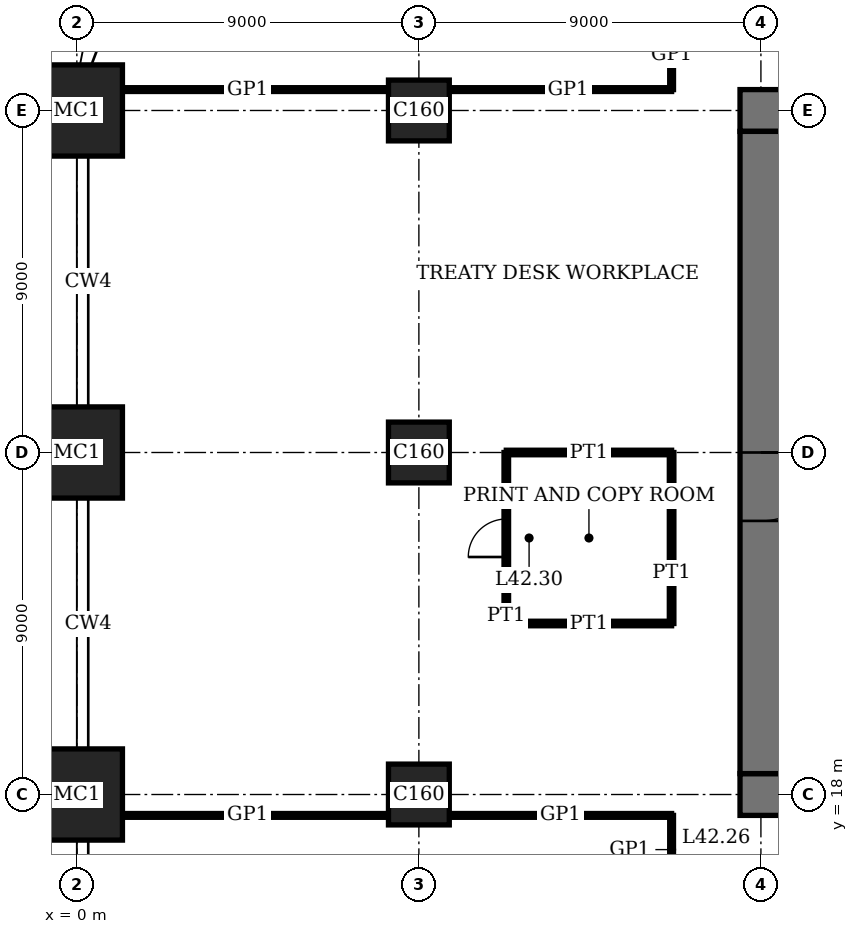
"""IFC4 building model, lengths in metres.
Left out: names, types, materials, properties, quantities, classifications, styles, units other than length and angle.
Written with IfcOpenShell. Run it as: python <this file> out.ifc"""

import sys

from ifc_helpers import new_model, si_unit, direction, frame, frame_2d, origin, origin_2d, place, context, subcontext, project, spatial, rectangle, extrude, element, fill, save


model = new_model("IFC4")
c1 = context("Model", 3, precision=1e-05, world=origin(), true_north=direction((0.0, 1.0)))
c2 = subcontext(c1, "Body", "Model", "MODEL_VIEW")
j1 = project(units=[si_unit("LENGTHUNIT", "METRE"), si_unit("PLANEANGLEUNIT", "RADIAN")], contexts=[c1])
p1 = place(None, origin())
s1 = spatial("IfcSite", under=j1, at=p1, CompositionType="ELEMENT")
p2 = place(p1, origin())
s2 = spatial("IfcBuilding", under=s1, at=p2, CompositionType="ELEMENT")
p3 = place(p2, frame((0.0, 0.0, 174.2)))
s3 = spatial("IfcBuildingStorey", under=s2, at=p3, CompositionType="ELEMENT", Elevation=174.2)
for number, where, z_axis, x_axis in (
    (1, (0.0, 18.0, 0.0), (0.0, 0.0, 1.0), (1.0, 0.0, 0.0)),
    (2, (0.0, 27.0, 0.0), (0.0, 0.0, 1.0), (1.0, 0.0, 0.0)),
    (3, (0.0, 36.0, 0.0), (0.0, 0.0, 1.0), (1.0, 0.0, 0.0)),
):
    element("IfcColumn", number, at=place(p3, frame(where, z_axis=z_axis, x_axis=x_axis)), inside=s3, PredefinedType="COLUMN", context=c2, shape_type="SweptSolid", body=[
        extrude(rectangle(XDim=2.4, YDim=2.4, at=origin_2d()), origin(), (0.0, 0.0, 1.0), 4.0),
    ])
for number, where, z_axis, x_axis in (
    (4, (9.0, 18.0, 0.0), (0.0, 0.0, 1.0), (1.0, 0.0, 0.0)),
    (5, (9.0, 27.0, 0.0), (0.0, 0.0, 1.0), (1.0, 0.0, 0.0)),
    (6, (9.0, 36.0, 0.0), (0.0, 0.0, 1.0), (1.0, 0.0, 0.0)),
):
    element("IfcColumn", number, at=place(p3, frame(where, z_axis=z_axis, x_axis=x_axis)), inside=s3, PredefinedType="COLUMN", context=c2, shape_type="SweptSolid", body=[
        extrude(rectangle(XDim=1.6, YDim=1.6, at=origin_2d()), origin(), (0.0, 0.0, 1.0), 4.0),
    ])
p4 = place(p3, frame((17.45, 18.0, 0.0), z_axis=(0.0, 0.0, 1.0), x_axis=(1.0, 0.0, 0.0)))
e7 = element("IfcWall", 7, at=p4, inside=s3, PredefinedType="SHEAR", context=c2, shape_type="SweptSolid", body=[
    extrude(rectangle(XDim=28.1, YDim=1.1, at=frame_2d((14.05, 0.0))), origin(), (0.0, 0.0, 1.0), 4.0),
])
p5 = place(p4, frame((11.55, 0.0, 0.0)))
e8 = element("IfcOpeningElement", 8, at=p5, cuts=e7, PredefinedType="OPENING", context=c2, shape_type="SweptSolid", body=[
    extrude(rectangle(XDim=1.0, YDim=2.4, at=frame_2d((0.5, 1.2))), frame((0.0, 0.56, 0.0), z_axis=(0.0, -1.0, 0.0), x_axis=(1.0, 0.0, 0.0)), (0.0, 0.0, 1.0), 1.12),
])
p6 = place(p4, frame((16.55, 0.0, 0.0)))
e9 = element("IfcOpeningElement", 9, at=p6, cuts=e7, PredefinedType="OPENING", context=c2, shape_type="SweptSolid", body=[
    extrude(rectangle(XDim=1.0, YDim=2.4, at=frame_2d((0.5, 1.2))), frame((0.0, 0.56, 0.0), z_axis=(0.0, -1.0, 0.0), x_axis=(1.0, 0.0, 0.0)), (0.0, 0.0, 1.0), 1.12),
])
p7 = place(p4, frame((20.0, 0.0, 0.0)))
e10 = element("IfcOpeningElement", 10, at=p7, cuts=e7, PredefinedType="OPENING", context=c2, shape_type="SweptSolid", body=[
    extrude(rectangle(XDim=1.1, YDim=2.4, at=frame_2d((0.55, 1.2))), frame((0.0, 0.56, 0.0), z_axis=(0.0, -1.0, 0.0), x_axis=(1.0, 0.0, 0.0)), (0.0, 0.0, 1.0), 1.12),
])
p8 = place(p4, frame((24.05, 0.0, 0.0)))
e11 = element("IfcOpeningElement", 11, at=p8, cuts=e7, PredefinedType="OPENING", context=c2, shape_type="SweptSolid", body=[
    extrude(rectangle(XDim=1.0, YDim=2.4, at=frame_2d((0.5, 1.2))), frame((0.0, 0.56, 0.0), z_axis=(0.0, -1.0, 0.0), x_axis=(1.0, 0.0, 0.0)), (0.0, 0.0, 1.0), 1.12),
])
p9 = place(p3, frame((45.55, 36.0, 0.0), z_axis=(0.0, 0.0, 1.0), x_axis=(-1.0, 0.0, 0.0)))
e12 = element("IfcWall", 12, at=p9, inside=s3, PredefinedType="SHEAR", context=c2, shape_type="SweptSolid", body=[
    extrude(rectangle(XDim=28.1, YDim=1.1, at=frame_2d((14.05, 0.0))), origin(), (0.0, 0.0, 1.0), 4.0),
])
p10 = place(p9, frame((11.55, 0.0, 0.0)))
e13 = element("IfcOpeningElement", 13, at=p10, cuts=e12, PredefinedType="OPENING", context=c2, shape_type="SweptSolid", body=[
    extrude(rectangle(XDim=1.0, YDim=2.4, at=frame_2d((0.5, 1.2))), frame((0.0, 0.56, 0.0), z_axis=(0.0, -1.0, 0.0), x_axis=(1.0, 0.0, 0.0)), (0.0, 0.0, 1.0), 1.12),
])
p11 = place(p9, frame((16.55, 0.0, 0.0)))
e14 = element("IfcOpeningElement", 14, at=p11, cuts=e12, PredefinedType="OPENING", context=c2, shape_type="SweptSolid", body=[
    extrude(rectangle(XDim=1.0, YDim=2.4, at=frame_2d((0.5, 1.2))), frame((0.0, 0.56, 0.0), z_axis=(0.0, -1.0, 0.0), x_axis=(1.0, 0.0, 0.0)), (0.0, 0.0, 1.0), 1.12),
])
p12 = place(p9, frame((20.0, 0.0, 0.0)))
e15 = element("IfcOpeningElement", 15, at=p12, cuts=e12, PredefinedType="OPENING", context=c2, shape_type="SweptSolid", body=[
    extrude(rectangle(XDim=1.1, YDim=2.4, at=frame_2d((0.55, 1.2))), frame((0.0, 0.56, 0.0), z_axis=(0.0, -1.0, 0.0), x_axis=(1.0, 0.0, 0.0)), (0.0, 0.0, 1.0), 1.12),
])
p13 = place(p9, frame((24.05, 0.0, 0.0)))
e16 = element("IfcOpeningElement", 16, at=p13, cuts=e12, PredefinedType="OPENING", context=c2, shape_type="SweptSolid", body=[
    extrude(rectangle(XDim=1.0, YDim=2.4, at=frame_2d((0.5, 1.2))), frame((0.0, 0.56, 0.0), z_axis=(0.0, -1.0, 0.0), x_axis=(1.0, 0.0, 0.0)), (0.0, 0.0, 1.0), 1.12),
])
p14 = place(p3, frame((18.0, 35.45, 0.0), z_axis=(0.0, 0.0, 1.0), x_axis=(0.0, -1.0, 0.0)))
e17 = element("IfcWall", 17, at=p14, inside=s3, PredefinedType="SHEAR", context=c2, shape_type="SweptSolid", body=[
    extrude(rectangle(XDim=16.9, YDim=1.1, at=frame_2d((8.45, 0.0))), origin(), (0.0, 0.0, 1.0), 4.0),
])
p15 = place(p14, frame((8.45, 0.0, 0.0)))
e18 = element("IfcOpeningElement", 18, at=p15, cuts=e17, PredefinedType="OPENING", context=c2, shape_type="SweptSolid", body=[
    extrude(rectangle(XDim=1.8, YDim=2.4, at=frame_2d((0.9, 1.2))), frame((0.0, 0.56, 0.0), z_axis=(0.0, -1.0, 0.0), x_axis=(1.0, 0.0, 0.0)), (0.0, 0.0, 1.0), 1.12),
])
p16 = place(p3, frame((1.2, 17.45, 0.0), z_axis=(0.0, 0.0, 1.0), x_axis=(1.0, 0.0, 0.0)))
e19 = element("IfcWall", 19, at=p16, inside=s3, PredefinedType="PARTITIONING", context=c2, shape_type="SweptSolid", body=[
    extrude(rectangle(XDim=7.0, YDim=0.1, at=frame_2d((3.5, 0.0))), origin(), (0.0, 0.0, 1.0), 3.75),
])
p17 = place(p3, frame((9.8, 17.45, 0.0), z_axis=(0.0, 0.0, 1.0), x_axis=(1.0, 0.0, 0.0)))
e20 = element("IfcWall", 20, at=p17, inside=s3, PredefinedType="PARTITIONING", context=c2, shape_type="SweptSolid", body=[
    extrude(rectangle(XDim=5.85, YDim=0.1, at=frame_2d((2.925, 0.0))), origin(), (0.0, 0.0, 1.0), 3.75),
])
p18 = place(p3, frame((11.3, 22.5, 0.0), z_axis=(0.0, 0.0, 1.0), x_axis=(1.0, 0.0, 0.0)))
e21 = element("IfcWall", 21, at=p18, inside=s3, PredefinedType="PARTITIONING", context=c2, shape_type="SweptSolid", body=[
    extrude(rectangle(XDim=4.35, YDim=0.12, at=frame_2d((2.175, 0.0))), origin(), (0.0, 0.0, 1.0), 3.1),
])
p19 = place(p3, frame((11.3, 27.0, 0.0), z_axis=(0.0, 0.0, 1.0), x_axis=(1.0, 0.0, 0.0)))
e22 = element("IfcWall", 22, at=p19, inside=s3, PredefinedType="PARTITIONING", context=c2, shape_type="SweptSolid", body=[
    extrude(rectangle(XDim=4.35, YDim=0.12, at=frame_2d((2.175, 0.0))), origin(), (0.0, 0.0, 1.0), 3.05),
])
p20 = place(p3, frame((1.2, 36.55, 0.0), z_axis=(0.0, 0.0, 1.0), x_axis=(1.0, 0.0, 0.0)))
e23 = element("IfcWall", 23, at=p20, inside=s3, PredefinedType="PARTITIONING", context=c2, shape_type="SweptSolid", body=[
    extrude(rectangle(XDim=7.0, YDim=0.1, at=frame_2d((3.5, 0.0))), origin(), (0.0, 0.0, 1.0), 3.75),
])
p21 = place(p3, frame((9.8, 36.55, 0.0), z_axis=(0.0, 0.0, 1.0), x_axis=(1.0, 0.0, 0.0)))
e24 = element("IfcWall", 24, at=p21, inside=s3, PredefinedType="PARTITIONING", context=c2, shape_type="SweptSolid", body=[
    extrude(rectangle(XDim=5.85, YDim=0.1, at=frame_2d((2.925, 0.0))), origin(), (0.0, 0.0, 1.0), 3.75),
])
p22 = place(p3, frame((11.3, 22.5, 0.0), z_axis=(0.0, 0.0, 1.0), x_axis=(0.0, 1.0, 0.0)))
e25 = element("IfcWall", 25, at=p22, inside=s3, PredefinedType="PARTITIONING", context=c2, shape_type="SweptSolid", body=[
    extrude(rectangle(XDim=4.5, YDim=0.12, at=frame_2d((2.25, 0.0))), origin(), (0.0, 0.0, 1.0), 3.75),
])
p23 = place(p22, frame((1.75, 0.0, 0.0)))
e26 = element("IfcOpeningElement", 26, at=p23, cuts=e25, PredefinedType="OPENING", context=c2, shape_type="SweptSolid", body=[
    extrude(rectangle(XDim=1.0, YDim=2.4, at=frame_2d((0.5, 1.2))), frame((0.0, 0.07, 0.0), z_axis=(0.0, -1.0, 0.0), x_axis=(1.0, 0.0, 0.0)), (0.0, 0.0, 1.0), 0.14),
])
p24 = place(p3, frame((15.65, 22.5, 0.0), z_axis=(0.0, 0.0, 1.0), x_axis=(0.0, 1.0, 0.0)))
e27 = element("IfcWall", 27, at=p24, inside=s3, PredefinedType="PARTITIONING", context=c2, shape_type="SweptSolid", body=[
    extrude(rectangle(XDim=4.5, YDim=0.12, at=frame_2d((2.25, 0.0))), origin(), (0.0, 0.0, 1.0), 3.75),
])
for number, where, z_axis, x_axis in (
    (28, (15.65, 15.65, 0.0), (0.0, 0.0, 1.0), (0.0, 1.0, 0.0)),
    (29, (15.65, 36.55, 0.0), (0.0, 0.0, 1.0), (0.0, 1.0, 0.0)),
):
    element("IfcWall", number, at=place(p3, frame(where, z_axis=z_axis, x_axis=x_axis)), inside=s3, PredefinedType="PARTITIONING", context=c2, shape_type="SweptSolid", body=[
        extrude(rectangle(XDim=1.8, YDim=0.1, at=frame_2d((0.9, 0.0))), origin(), (0.0, 0.0, 1.0), 3.75),
    ])
p25 = place(p15, origin())
e30 = element("IfcDoor", 30, at=p25, inside=s3, OperationType="DOUBLE_DOOR_DOUBLE_SWING", PredefinedType="DOOR", context=c2, shape_type="SweptSolid", body=[
    extrude(rectangle(XDim=1.8, YDim=2.4, at=frame_2d((0.9, 1.2))), frame((0.0, 0.03, 0.0), z_axis=(0.0, -1.0, 0.0), x_axis=(1.0, 0.0, 0.0)), (0.0, 0.0, 1.0), 0.06),
    extrude(rectangle(XDim=0.04, YDim=2.4, at=frame_2d((0.02, 1.2))), frame((0.0, 0.55, 0.0), z_axis=(0.0, -1.0, 0.0), x_axis=(1.0, 0.0, 0.0)), (0.0, 0.0, 1.0), 1.1),
    extrude(rectangle(XDim=0.04, YDim=2.4, at=frame_2d((1.78, 1.2))), frame((0.0, 0.55, 0.0), z_axis=(0.0, -1.0, 0.0), x_axis=(1.0, 0.0, 0.0)), (0.0, 0.0, 1.0), 1.1),
    extrude(rectangle(XDim=1.8, YDim=0.04, at=frame_2d((0.9, 2.38))), frame((0.0, 0.55, 0.0), z_axis=(0.0, -1.0, 0.0), x_axis=(1.0, 0.0, 0.0)), (0.0, 0.0, 1.0), 1.1),
])
fill(e18, e30)
p26 = place(p23, origin())
e31 = element("IfcDoor", 31, at=p26, inside=s3, OperationType="SINGLE_SWING_RIGHT", PredefinedType="DOOR", context=c2, shape_type="SweptSolid", body=[
    extrude(rectangle(XDim=1.0, YDim=2.4, at=frame_2d((0.5, 1.2))), frame((0.0, 0.025, 0.0), z_axis=(0.0, -1.0, 0.0), x_axis=(1.0, 0.0, 0.0)), (0.0, 0.0, 1.0), 0.05),
])
fill(e26, e31)
save(model, sys.argv[1])
